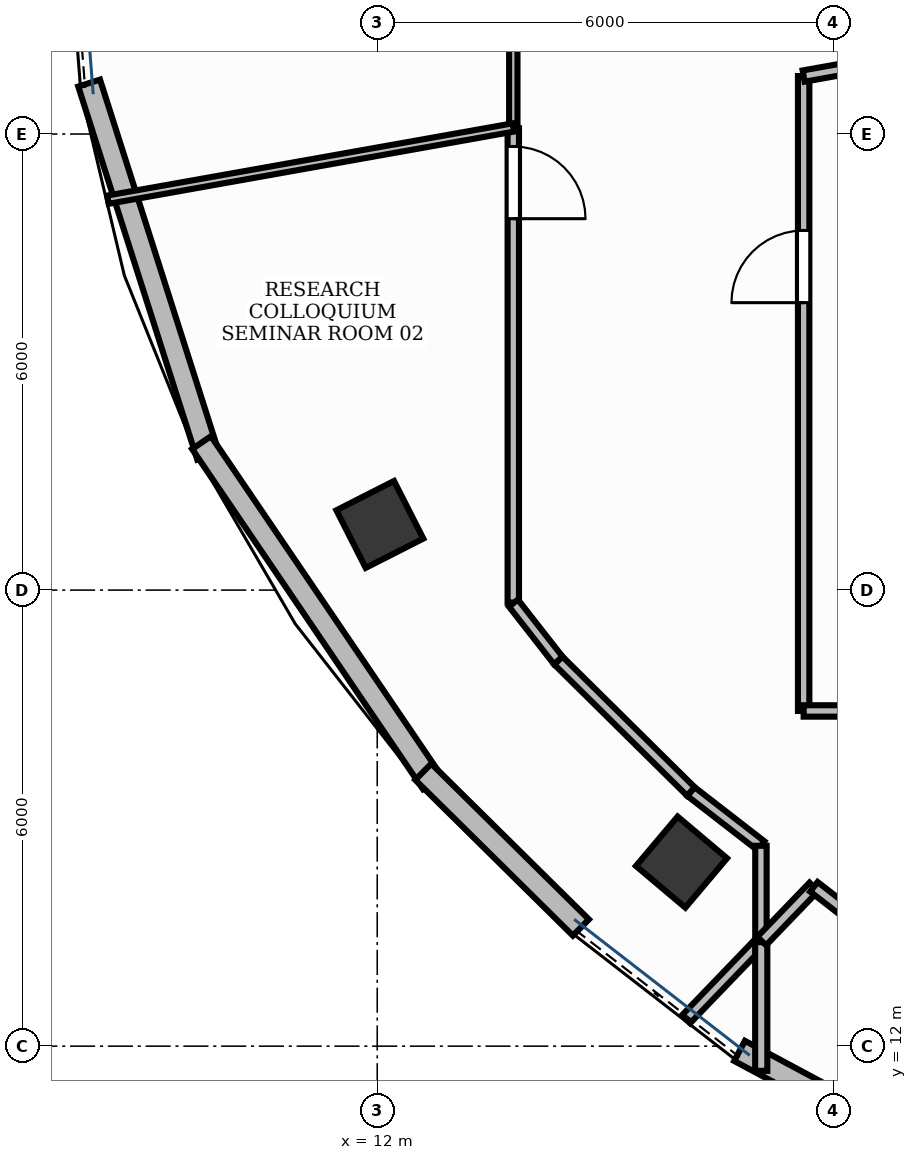
"""IFC4 building model, lengths in metres.
Left out: names, types, materials, properties, quantities, classifications, styles, units other than length and angle.
Written with IfcOpenShell. Run it as: python <this file> out.ifc"""

import sys

from ifc_helpers import new_model, si_unit, direction, frame, frame_2d, origin, origin_2d, place, context, subcontext, project, spatial, rectangle, extrude, element, fill, save


model = new_model("IFC4")
c1 = context("Model", 3, precision=1e-05, world=origin(), true_north=direction((0.0, 1.0)))
c2 = subcontext(c1, "Body", "Model", "MODEL_VIEW")
j1 = project(units=[si_unit("LENGTHUNIT", "METRE"), si_unit("PLANEANGLEUNIT", "RADIAN")], contexts=[c1])
p1 = place(None, origin())
s1 = spatial("IfcSite", under=j1, at=p1, CompositionType="ELEMENT")
p2 = place(p1, origin())
s2 = spatial("IfcBuilding", under=s1, at=p2, CompositionType="ELEMENT")
p3 = place(p2, frame((0.0, 0.0, 260.4)))
s3 = spatial("IfcBuildingStorey", under=s2, at=p3, CompositionType="ELEMENT", Elevation=260.4)
for number, where, z_axis, x_axis in (
    (1, (12.034, 18.864, -0.0), (0.0, 0.0, 1.0), (-0.453, 0.891, 0.0)),
    (2, (16.003, 14.421, -0.0), (0.0, 0.0, 1.0), (-0.764, 0.645, 0.0)),
):
    element("IfcColumn", number, at=place(p3, frame(where, z_axis=z_axis, x_axis=x_axis)), inside=s3, PredefinedType="COLUMN", context=c2, shape_type="SweptSolid", body=[
        extrude(rectangle(XDim=0.85, YDim=0.85, at=origin_2d()), origin(), (0.0, 0.0, 1.0), 3.901),
    ])
p4 = place(p3, frame((8.21, 24.67, 0.0), z_axis=(0.0, 0.0, 1.0), x_axis=(0.303876387353, -0.952711467974, 0.0)))
e3 = element("IfcWall", 3, at=p4, inside=s3, PredefinedType="STANDARD", context=c2, shape_type="SweptSolid", body=[
    extrude(rectangle(XDim=5.152, YDim=0.3, at=frame_2d((2.576, 0.0))), origin(), (0.0, 0.0, 1.0), 3.9),
])
p5 = place(p3, frame((9.689, 19.94, 0.0), z_axis=(0.0, 0.0, 1.0), x_axis=(0.561547791281, -0.827444305139, 0.0)))
e4 = element("IfcWall", 4, at=p5, inside=s3, PredefinedType="STANDARD", context=c2, shape_type="SweptSolid", body=[
    extrude(rectangle(XDim=5.407, YDim=0.3, at=frame_2d((2.704, 0.0))), origin(), (0.0, 0.0, 1.0), 3.9),
])
p6 = place(p3, frame((12.606, 15.61, 0.0), z_axis=(0.0, 0.0, 1.0), x_axis=(0.711366092533, -0.702821657602, 0.0)))
e5 = element("IfcWall", 5, at=p6, inside=s3, PredefinedType="STANDARD", context=c2, shape_type="SweptSolid", body=[
    extrude(rectangle(XDim=2.915, YDim=0.3, at=frame_2d((1.457, 0.0))), origin(), (0.0, 0.0, 1.0), 3.9),
])
p7 = place(p3, frame((16.767, 11.938, 0.0), z_axis=(0.0, 0.0, 1.0), x_axis=(0.881337457, -0.472487340454, 0.0)))
e6 = element("IfcWall", 6, at=p7, inside=s3, PredefinedType="STANDARD", context=c2, shape_type="SweptSolid", body=[
    extrude(rectangle(XDim=6.088, YDim=0.3, at=frame_2d((3.044, 0.0))), origin(), (0.0, 0.0, 1.0), 3.47),
])
p8 = place(p3, frame((13.79, 28.39, 0.0), z_axis=(0.0, 0.0, 1.0), x_axis=(0.0, -1.0, 0.0)))
e7 = element("IfcWall", 7, at=p8, inside=s3, PredefinedType="MOVABLE", context=c2, shape_type="SweptSolid", body=[
    extrude(rectangle(XDim=4.304, YDim=0.11, at=frame_2d((2.152, 0.0))), origin(), (0.0, 0.0, 1.0), 2.91),
])
p9 = place(p8, frame((0.24, 0.0, 0.0)))
e8 = element("IfcOpeningElement", 8, at=p9, cuts=e7, PredefinedType="OPENING", context=c2, shape_type="SweptSolid", body=[
    extrude(rectangle(XDim=0.95, YDim=2.15, at=frame_2d((0.475, 1.075))), frame((0.0, 0.07, 0.0), z_axis=(0.0, -1.0, 0.0), x_axis=(1.0, 0.0, 0.0)), (0.0, 0.0, 1.0), 0.14),
])
p10 = place(p3, frame((13.79, 24.076, 0.0), z_axis=(0.0, 0.0, 1.0), x_axis=(0.0, -1.0, 0.0)))
e9 = element("IfcWall", 9, at=p10, inside=s3, PredefinedType="PARTITIONING", context=c2, shape_type="SweptSolid", body=[
    extrude(rectangle(XDim=6.241, YDim=0.15, at=frame_2d((3.12, 0.0))), origin(), (0.0, 0.0, 1.0), 2.91),
])
p11 = place(p10, frame((0.24, 0.0, 0.0)))
e10 = element("IfcOpeningElement", 10, at=p11, cuts=e9, PredefinedType="OPENING", context=c2, shape_type="SweptSolid", body=[
    extrude(rectangle(XDim=0.95, YDim=2.15, at=frame_2d((0.475, 1.075))), frame((0.0, 0.09, 0.0), z_axis=(0.0, -1.0, 0.0), x_axis=(1.0, 0.0, 0.0)), (0.0, 0.0, 1.0), 0.18),
])
p12 = place(p3, frame((17.61, 16.41, 0.0), z_axis=(0.0, 0.0, 1.0), x_axis=(0.0, 1.0, 0.0)))
e11 = element("IfcWall", 11, at=p12, inside=s3, PredefinedType="PARTITIONING", context=c2, shape_type="SweptSolid", body=[
    extrude(rectangle(XDim=8.353, YDim=0.15, at=frame_2d((4.176, 0.0))), origin(), (0.0, 0.0, 1.0), 2.91),
])
p13 = place(p12, frame((5.371, 0.0, 0.0)))
e12 = element("IfcOpeningElement", 12, at=p13, cuts=e11, PredefinedType="OPENING", context=c2, shape_type="SweptSolid", body=[
    extrude(rectangle(XDim=0.95, YDim=2.15, at=frame_2d((0.475, 1.075))), frame((0.0, 0.09, 0.0), z_axis=(0.0, -1.0, 0.0), x_axis=(1.0, 0.0, 0.0)), (0.0, 0.0, 1.0), 0.18),
])
p14 = place(p3, frame((13.79, 24.086, 0.0), z_axis=(0.0, 0.0, 1.0), x_axis=(-0.984501864113, -0.175374113137, 0.0)))
e13 = element("IfcWall", 13, at=p14, inside=s3, PredefinedType="MOVABLE", context=c2, shape_type="SweptSolid", body=[
    extrude(rectangle(XDim=5.417, YDim=0.11, at=frame_2d((2.708, 0.0))), origin(), (0.0, 0.0, 1.0), 2.91),
])
p15 = place(p3, frame((17.048, 13.378, 0.0), z_axis=(0.0, 0.0, 1.0), x_axis=(-0.693410652624, -0.720542619716, 0.0)))
e14 = element("IfcWall", 14, at=p15, inside=s3, PredefinedType="PARTITIONING", context=c2, shape_type="SweptSolid", body=[
    extrude(rectangle(XDim=1.422, YDim=0.15, at=frame_2d((0.711, 0.0))), origin(), (0.0, 0.0, 1.0), 2.91),
])
p16 = place(p3, frame((13.792, 17.829, 0.0), z_axis=(0.0, 0.0, 1.0), x_axis=(0.615841557122, -0.787870025145, 0.0)))
e15 = element("IfcWall", 15, at=p16, inside=s3, PredefinedType="PARTITIONING", context=c2, shape_type="SweptSolid", body=[
    extrude(rectangle(XDim=0.959, YDim=0.15, at=frame_2d((0.48, 0.0))), origin(), (0.0, 0.0, 1.0), 2.91),
])
p17 = place(p3, frame((14.384, 17.073, 0.0), z_axis=(0.0, 0.0, 1.0), x_axis=(0.711327015195, -0.702861207817, 0.0)))
e16 = element("IfcWall", 16, at=p17, inside=s3, PredefinedType="PARTITIONING", context=c2, shape_type="SweptSolid", body=[
    extrude(rectangle(XDim=2.451, YDim=0.15, at=frame_2d((1.226, 0.0))), origin(), (0.0, 0.0, 1.0), 2.91),
])
p18 = place(p3, frame((16.128, 15.349, 0.0), z_axis=(0.0, 0.0, 1.0), x_axis=(0.790536936783, -0.612414362651, 0.0)))
e17 = element("IfcWall", 17, at=p18, inside=s3, PredefinedType="PARTITIONING", context=c2, shape_type="SweptSolid", body=[
    extrude(rectangle(XDim=1.164, YDim=0.15, at=frame_2d((0.582, 0.0))), origin(), (0.0, 0.0, 1.0), 2.91),
])
p19 = place(p3, frame((17.048, 14.636, 0.0), z_axis=(0.0, 0.0, 1.0), x_axis=(0.0, -1.0, 0.0)))
e18 = element("IfcWall", 18, at=p19, inside=s3, PredefinedType="PARTITIONING", context=c2, shape_type="SweptSolid", body=[
    extrude(rectangle(XDim=1.258, YDim=0.15, at=frame_2d((0.629, 0.0))), origin(), (0.0, 0.0, 1.0), 2.91),
])
p20 = place(p3, frame((25.6, 16.41, 0.0), z_axis=(0.0, 0.0, 1.0), x_axis=(-1.0, 0.0, 0.0)))
e19 = element("IfcWall", 19, at=p20, inside=s3, PredefinedType="PARTITIONING", context=c2, shape_type="SweptSolid", body=[
    extrude(rectangle(XDim=7.99, YDim=0.15, at=frame_2d((3.995, 0.0))), origin(), (0.0, 0.0, 1.0), 2.91),
])
p21 = place(p3, frame((17.61, 24.763, 0.0), z_axis=(0.0, 0.0, 1.0), x_axis=(0.984503916892, 0.175362589008, 0.0)))
e20 = element("IfcWall", 20, at=p21, inside=s3, PredefinedType="PARTITIONING", context=c2, shape_type="SweptSolid", body=[
    extrude(rectangle(XDim=1.757, YDim=0.15, at=frame_2d((0.878, 0.0))), origin(), (0.0, 0.0, 1.0), 2.91),
])
p22 = place(p3, frame((17.052, 11.675, 0.0), z_axis=(0.0, 0.0, 1.0), x_axis=(0.0, 1.0, 0.0)))
e21 = element("IfcWall", 21, at=p22, inside=s3, PredefinedType="PARTITIONING", context=c2, shape_type="SweptSolid", body=[
    extrude(rectangle(XDim=1.693, YDim=0.16, at=frame_2d((0.846, 0.0))), origin(), (0.0, 0.0, 1.0), 2.91),
])
p23 = place(p3, frame((17.058, 13.383, 0.0), z_axis=(0.0, 0.0, 1.0), x_axis=(0.693419009771, 0.720534577163, 0.0)))
e22 = element("IfcWall", 22, at=p23, inside=s3, PredefinedType="PARTITIONING", context=c2, shape_type="SweptSolid", body=[
    extrude(rectangle(XDim=0.99, YDim=0.16, at=frame_2d((0.495, 0.0))), origin(), (0.0, 0.0, 1.0), 2.91),
])
p24 = place(p3, frame((17.745, 14.096, 0.0), z_axis=(0.0, 0.0, 1.0), x_axis=(0.790478415243, -0.612489897904, 0.0)))
e23 = element("IfcWall", 23, at=p24, inside=s3, PredefinedType="PARTITIONING", context=c2, shape_type="SweptSolid", body=[
    extrude(rectangle(XDim=0.513, YDim=0.16, at=frame_2d((0.256, 0.0))), origin(), (0.0, 0.0, 1.0), 2.91),
])
p25 = place(p11, origin())
e24 = element("IfcDoor", 24, at=p25, inside=s3, OperationType="SINGLE_SWING_RIGHT", PredefinedType="DOOR", context=c2, shape_type="SweptSolid", body=[
    extrude(rectangle(XDim=0.95, YDim=2.15, at=frame_2d((0.475, 1.075))), frame((0.0, 0.025, 0.0), z_axis=(0.0, -1.0, 0.0), x_axis=(1.0, 0.0, 0.0)), (0.0, 0.0, 1.0), 0.05),
])
fill(e10, e24)
p26 = place(p13, origin())
e25 = element("IfcDoor", 25, at=p26, inside=s3, OperationType="SINGLE_SWING_LEFT", PredefinedType="DOOR", context=c2, shape_type="SweptSolid", body=[
    extrude(rectangle(XDim=0.95, YDim=2.15, at=frame_2d((0.475, 1.075))), frame((0.0, 0.025, 0.0), z_axis=(0.0, -1.0, 0.0), x_axis=(1.0, 0.0, 0.0)), (0.0, 0.0, 1.0), 0.05),
])
fill(e12, e25)
save(model, sys.argv[1])
